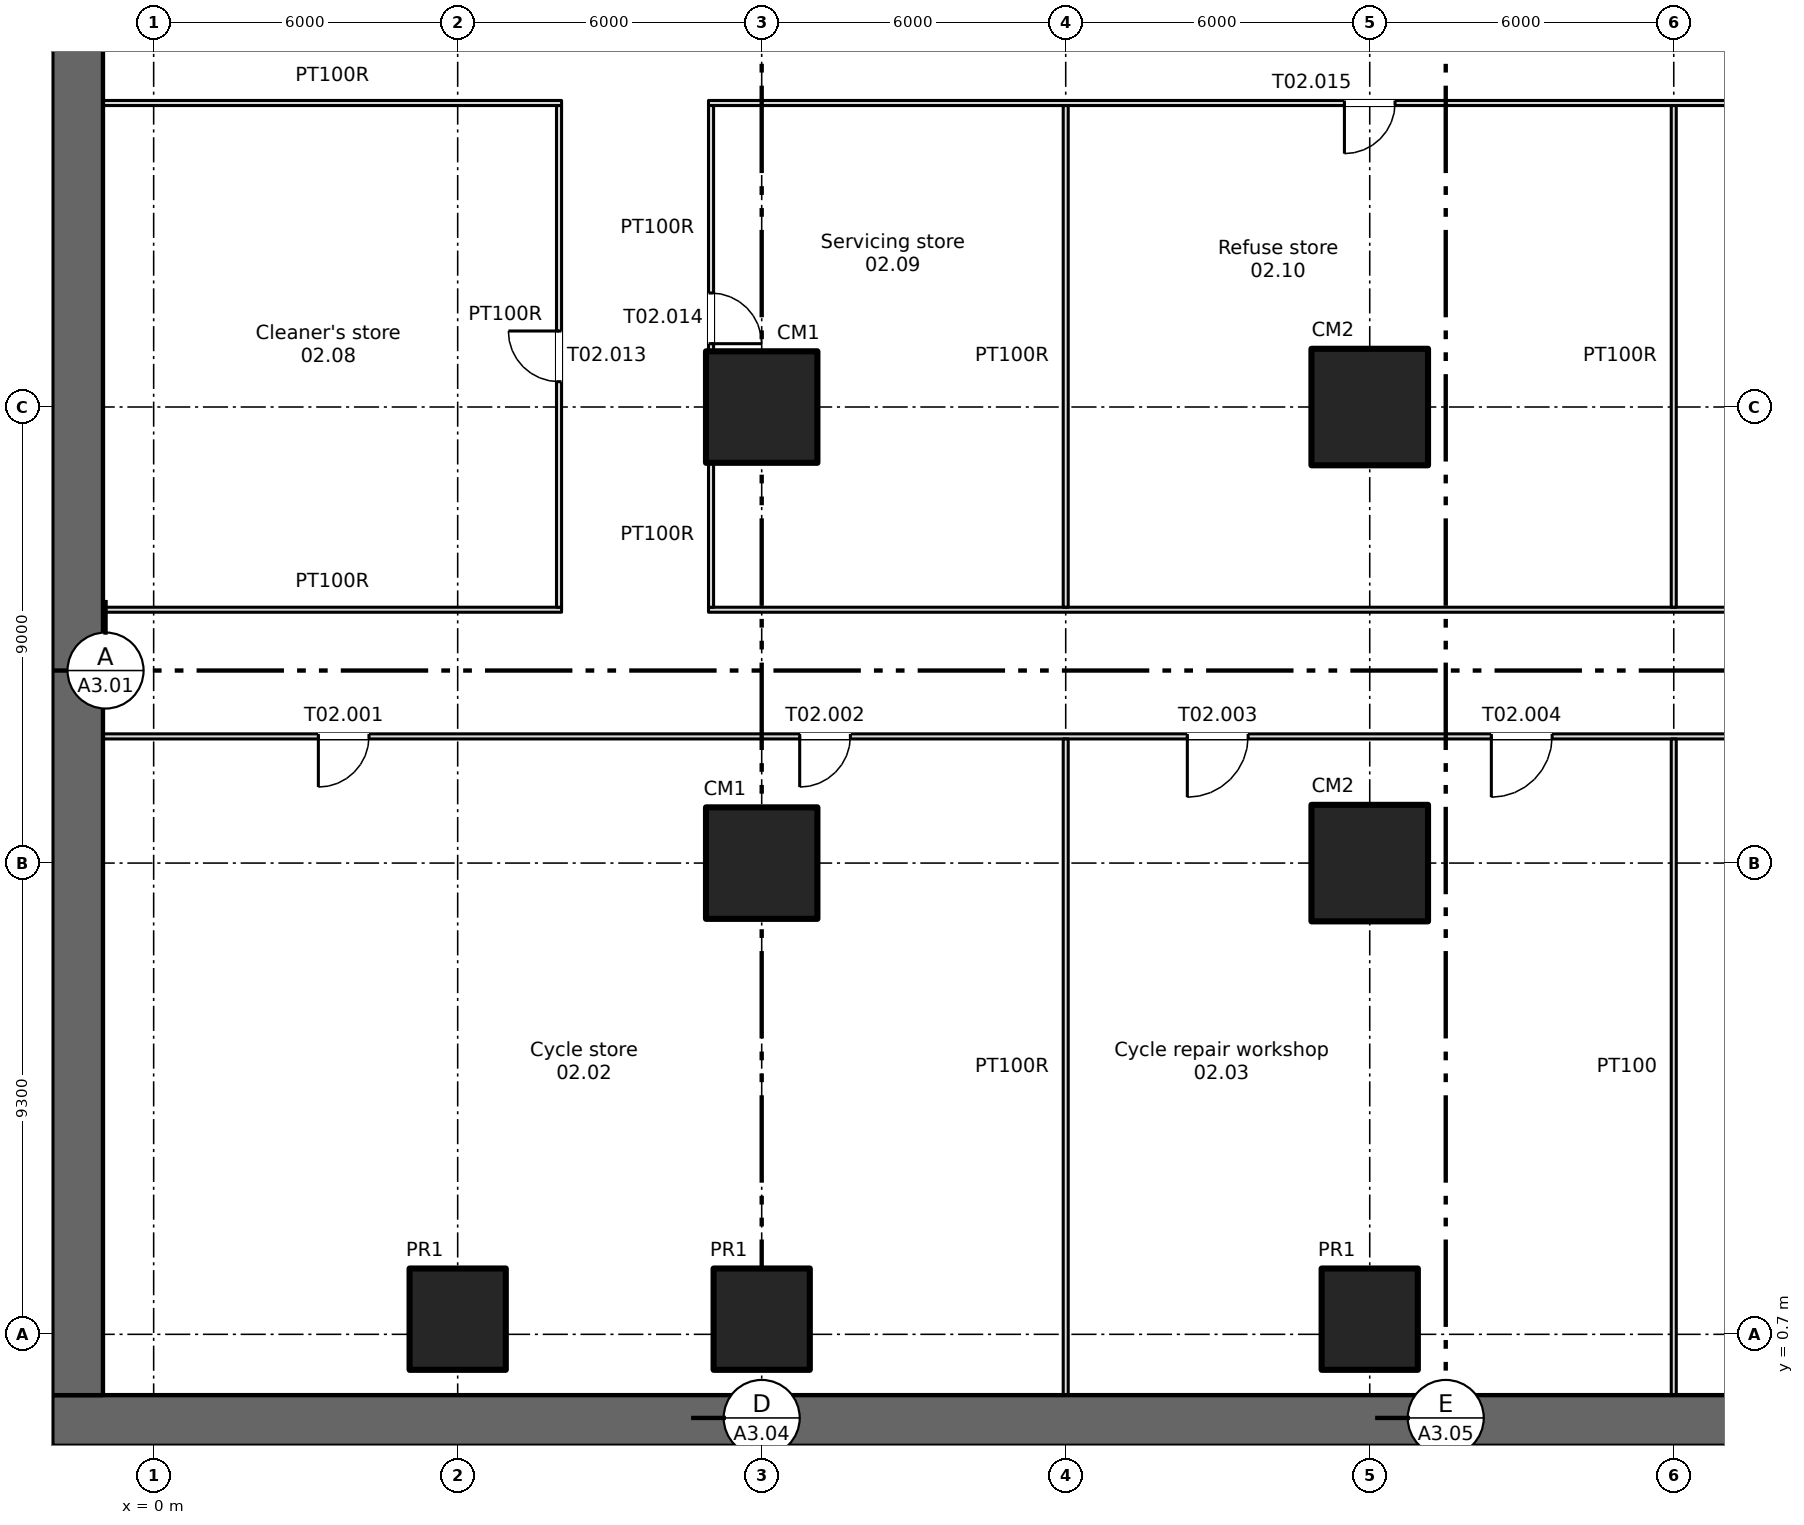
"""IFC4 building model, lengths in metres.
Left out: names, types, materials, properties, quantities, classifications, styles, units other than length and angle.
Written with IfcOpenShell. Run it as: python <this file> out.ifc"""

import sys

from ifc_helpers import new_model, si_unit, direction, frame, frame_2d, origin, origin_2d, place, context, subcontext, project, spatial, rectangle, extrude, element, fill, save


model = new_model("IFC4")
c1 = context("Model", 3, precision=1e-05, world=origin(), true_north=direction((0.0, 1.0)))
c2 = subcontext(c1, "Body", "Model", "MODEL_VIEW")
j1 = project(units=[si_unit("LENGTHUNIT", "METRE"), si_unit("PLANEANGLEUNIT", "RADIAN")], contexts=[c1])
p1 = place(None, origin())
s1 = spatial("IfcSite", under=j1, at=p1, CompositionType="ELEMENT")
p2 = place(p1, origin())
s2 = spatial("IfcBuilding", under=s1, at=p2, CompositionType="ELEMENT")
p3 = place(p2, frame((0.0, 0.0, -6.0)))
s3 = spatial("IfcBuildingStorey", under=s2, at=p3, CompositionType="ELEMENT", Elevation=-6.0)
p4 = place(p3, frame((-2.0, -1.0, 0.0), z_axis=(0.0, 0.0, 1.0), x_axis=(1.0, 0.0, 0.0)))
e1 = element("IfcWall", 1, at=p4, inside=s3, PredefinedType="SOLIDWALL", context=c2, shape_type="SweptSolid", body=[
    extrude(rectangle(XDim=82.0, YDim=1.0, at=frame_2d((41.0, 0.0))), origin(), (0.0, 0.0, 1.0), 5.55),
])
p5 = place(p3, frame((-1.5, -0.5, 0.0), z_axis=(0.0, 0.0, 1.0), x_axis=(0.0, 1.0, 0.0)))
e2 = element("IfcWall", 2, at=p5, inside=s3, PredefinedType="SOLIDWALL", context=c2, shape_type="SweptSolid", body=[
    extrude(rectangle(XDim=46.0, YDim=1.0, at=frame_2d((23.0, 0.0))), origin(), (0.0, 0.0, 1.0), 5.55),
])
for number, where, z_axis, x_axis in (
    (3, (6.0, 1.0, 0.0), (0.0, 0.0, 1.0), (1.0, 0.0, 0.0)),
    (4, (12.0, 1.0, 0.0), (0.0, 0.0, 1.0), (1.0, 0.0, 0.0)),
    (5, (24.0, 1.0, 0.0), (0.0, 0.0, 1.0), (1.0, 0.0, 0.0)),
):
    element("IfcColumn", number, at=place(p3, frame(where, z_axis=z_axis, x_axis=x_axis)), inside=s3, PredefinedType="COLUMN", context=c2, shape_type="SweptSolid", body=[
        extrude(rectangle(XDim=1.9, YDim=2.0, at=origin_2d()), origin(), (0.0, 0.0, 1.0), 5.55),
    ])
for number, where, z_axis, x_axis in (
    (6, (12.0, 10.0, 0.0), (0.0, 0.0, 1.0), (1.0, 0.0, 0.0)),
    (7, (12.0, 19.0, 0.0), (0.0, 0.0, 1.0), (1.0, 0.0, 0.0)),
):
    element("IfcColumn", number, at=place(p3, frame(where, z_axis=z_axis, x_axis=x_axis)), inside=s3, PredefinedType="COLUMN", context=c2, shape_type="SweptSolid", body=[
        extrude(rectangle(XDim=2.2, YDim=2.2, at=origin_2d()), origin(), (0.0, 0.0, 1.0), 5.55),
    ])
for number, where, z_axis, x_axis in (
    (8, (24.0, 10.0, 0.0), (0.0, 0.0, 1.0), (1.0, 0.0, 0.0)),
    (9, (24.0, 19.0, 0.0), (0.0, 0.0, 1.0), (1.0, 0.0, 0.0)),
):
    element("IfcColumn", number, at=place(p3, frame(where, z_axis=z_axis, x_axis=x_axis)), inside=s3, PredefinedType="COLUMN", context=c2, shape_type="SweptSolid", body=[
        extrude(rectangle(XDim=2.3, YDim=2.3, at=origin_2d()), origin(), (0.0, 0.0, 1.0), 5.55),
    ])
p6 = place(p3, frame((-1.0, 12.5, 0.0), z_axis=(0.0, 0.0, 1.0), x_axis=(1.0, 0.0, 0.0)))
e10 = element("IfcWall", 10, at=p6, inside=s3, PredefinedType="PARTITIONING", context=c2, shape_type="SweptSolid", body=[
    extrude(rectangle(XDim=80.0, YDim=0.1, at=frame_2d((40.0, 0.0))), origin(), (0.0, 0.0, 1.0), 5.55),
])
p7 = place(p6, frame((4.25, 0.0, 0.0)))
e11 = element("IfcOpeningElement", 11, at=p7, cuts=e10, PredefinedType="OPENING", context=c2, shape_type="SweptSolid", body=[
    extrude(rectangle(XDim=1.0, YDim=2.1, at=frame_2d((0.5, 1.05))), frame((0.0, 0.06, 0.0), z_axis=(0.0, -1.0, 0.0), x_axis=(1.0, 0.0, 0.0)), (0.0, 0.0, 1.0), 0.12),
])
p8 = place(p6, frame((13.75, 0.0, 0.0)))
e12 = element("IfcOpeningElement", 12, at=p8, cuts=e10, PredefinedType="OPENING", context=c2, shape_type="SweptSolid", body=[
    extrude(rectangle(XDim=1.0, YDim=2.1, at=frame_2d((0.5, 1.05))), frame((0.0, 0.06, 0.0), z_axis=(0.0, -1.0, 0.0), x_axis=(1.0, 0.0, 0.0)), (0.0, 0.0, 1.0), 0.12),
])
p9 = place(p6, frame((21.4, 0.0, 0.0)))
e13 = element("IfcOpeningElement", 13, at=p9, cuts=e10, PredefinedType="OPENING", context=c2, shape_type="SweptSolid", body=[
    extrude(rectangle(XDim=1.2, YDim=2.1, at=frame_2d((0.6, 1.05))), frame((0.0, 0.06, 0.0), z_axis=(0.0, -1.0, 0.0), x_axis=(1.0, 0.0, 0.0)), (0.0, 0.0, 1.0), 0.12),
])
p10 = place(p6, frame((27.4, 0.0, 0.0)))
e14 = element("IfcOpeningElement", 14, at=p10, cuts=e10, PredefinedType="OPENING", context=c2, shape_type="SweptSolid", body=[
    extrude(rectangle(XDim=1.2, YDim=2.1, at=frame_2d((0.6, 1.05))), frame((0.0, 0.06, 0.0), z_axis=(0.0, -1.0, 0.0), x_axis=(1.0, 0.0, 0.0)), (0.0, 0.0, 1.0), 0.12),
])
p11 = place(p6, frame((33.4, 0.0, 0.0)))
e15 = element("IfcOpeningElement", 15, at=p11, cuts=e10, PredefinedType="OPENING", context=c2, shape_type="SweptSolid", body=[
    extrude(rectangle(XDim=1.2, YDim=2.1, at=frame_2d((0.6, 1.05))), frame((0.0, 0.06, 0.0), z_axis=(0.0, -1.0, 0.0), x_axis=(1.0, 0.0, 0.0)), (0.0, 0.0, 1.0), 0.12),
])
p12 = place(p6, frame((39.4, 0.0, 0.0)))
e16 = element("IfcOpeningElement", 16, at=p12, cuts=e10, PredefinedType="OPENING", context=c2, shape_type="SweptSolid", body=[
    extrude(rectangle(XDim=1.2, YDim=2.1, at=frame_2d((0.6, 1.05))), frame((0.0, 0.06, 0.0), z_axis=(0.0, -1.0, 0.0), x_axis=(1.0, 0.0, 0.0)), (0.0, 0.0, 1.0), 0.12),
])
p13 = place(p6, frame((45.4, 0.0, 0.0)))
e17 = element("IfcOpeningElement", 17, at=p13, cuts=e10, PredefinedType="OPENING", context=c2, shape_type="SweptSolid", body=[
    extrude(rectangle(XDim=1.2, YDim=2.1, at=frame_2d((0.6, 1.05))), frame((0.0, 0.06, 0.0), z_axis=(0.0, -1.0, 0.0), x_axis=(1.0, 0.0, 0.0)), (0.0, 0.0, 1.0), 0.12),
])
p14 = place(p6, frame((51.4, 0.0, 0.0)))
e18 = element("IfcOpeningElement", 18, at=p14, cuts=e10, PredefinedType="OPENING", context=c2, shape_type="SweptSolid", body=[
    extrude(rectangle(XDim=1.2, YDim=2.1, at=frame_2d((0.6, 1.05))), frame((0.0, 0.06, 0.0), z_axis=(0.0, -1.0, 0.0), x_axis=(1.0, 0.0, 0.0)), (0.0, 0.0, 1.0), 0.12),
])
p15 = place(p6, frame((57.4, 0.0, 0.0)))
e19 = element("IfcOpeningElement", 19, at=p15, cuts=e10, PredefinedType="OPENING", context=c2, shape_type="SweptSolid", body=[
    extrude(rectangle(XDim=1.2, YDim=2.1, at=frame_2d((0.6, 1.05))), frame((0.0, 0.06, 0.0), z_axis=(0.0, -1.0, 0.0), x_axis=(1.0, 0.0, 0.0)), (0.0, 0.0, 1.0), 0.12),
])
p16 = place(p6, frame((63.4, 0.0, 0.0)))
e20 = element("IfcOpeningElement", 20, at=p16, cuts=e10, PredefinedType="OPENING", context=c2, shape_type="SweptSolid", body=[
    extrude(rectangle(XDim=1.2, YDim=2.1, at=frame_2d((0.6, 1.05))), frame((0.0, 0.06, 0.0), z_axis=(0.0, -1.0, 0.0), x_axis=(1.0, 0.0, 0.0)), (0.0, 0.0, 1.0), 0.12),
])
p17 = place(p6, frame((69.75, 0.0, 0.0)))
e21 = element("IfcOpeningElement", 21, at=p17, cuts=e10, PredefinedType="OPENING", context=c2, shape_type="SweptSolid", body=[
    extrude(rectangle(XDim=1.0, YDim=2.1, at=frame_2d((0.5, 1.05))), frame((0.0, 0.06, 0.0), z_axis=(0.0, -1.0, 0.0), x_axis=(1.0, 0.0, 0.0)), (0.0, 0.0, 1.0), 0.12),
])
p18 = place(p6, frame((76.25, 0.0, 0.0)))
e22 = element("IfcOpeningElement", 22, at=p18, cuts=e10, PredefinedType="OPENING", context=c2, shape_type="SweptSolid", body=[
    extrude(rectangle(XDim=1.0, YDim=2.1, at=frame_2d((0.5, 1.05))), frame((0.0, 0.06, 0.0), z_axis=(0.0, -1.0, 0.0), x_axis=(1.0, 0.0, 0.0)), (0.0, 0.0, 1.0), 0.12),
])
p19 = place(p3, frame((-1.0, 15.0, 0.0), z_axis=(0.0, 0.0, 1.0), x_axis=(1.0, 0.0, 0.0)))
e23 = element("IfcWall", 23, at=p19, inside=s3, PredefinedType="PARTITIONING", context=c2, shape_type="SweptSolid", body=[
    extrude(rectangle(XDim=9.05, YDim=0.1, at=frame_2d((4.525, 0.0))), origin(), (0.0, 0.0, 1.0), 5.55),
])
p20 = place(p3, frame((10.95, 15.0, 0.0), z_axis=(0.0, 0.0, 1.0), x_axis=(1.0, 0.0, 0.0)))
e24 = element("IfcWall", 24, at=p20, inside=s3, PredefinedType="PARTITIONING", context=c2, shape_type="SweptSolid", body=[
    extrude(rectangle(XDim=56.1, YDim=0.1, at=frame_2d((28.05, 0.0))), origin(), (0.0, 0.0, 1.0), 5.55),
])
p21 = place(p3, frame((-1.0, 25.0, 0.0), z_axis=(0.0, 0.0, 1.0), x_axis=(1.0, 0.0, 0.0)))
e25 = element("IfcWall", 25, at=p21, inside=s3, PredefinedType="PARTITIONING", context=c2, shape_type="SweptSolid", body=[
    extrude(rectangle(XDim=9.05, YDim=0.1, at=frame_2d((4.525, 0.0))), origin(), (0.0, 0.0, 1.0), 5.55),
])
p22 = place(p3, frame((10.95, 25.0, 0.0), z_axis=(0.0, 0.0, 1.0), x_axis=(1.0, 0.0, 0.0)))
e26 = element("IfcWall", 26, at=p22, inside=s3, PredefinedType="PARTITIONING", context=c2, shape_type="SweptSolid", body=[
    extrude(rectangle(XDim=56.1, YDim=0.1, at=frame_2d((28.05, 0.0))), origin(), (0.0, 0.0, 1.0), 5.55),
])
p23 = place(p22, frame((12.55, 0.0, 0.0)))
e27 = element("IfcOpeningElement", 27, at=p23, cuts=e26, PredefinedType="OPENING", context=c2, shape_type="SweptSolid", body=[
    extrude(rectangle(XDim=1.0, YDim=2.1, at=frame_2d((0.5, 1.05))), frame((0.0, 0.06, 0.0), z_axis=(0.0, -1.0, 0.0), x_axis=(1.0, 0.0, 0.0)), (0.0, 0.0, 1.0), 0.12),
])
p24 = place(p22, frame((24.15, 0.0, 0.0)))
e28 = element("IfcOpeningElement", 28, at=p24, cuts=e26, PredefinedType="OPENING", context=c2, shape_type="SweptSolid", body=[
    extrude(rectangle(XDim=1.8, YDim=2.1, at=frame_2d((0.9, 1.05))), frame((0.0, 0.06, 0.0), z_axis=(0.0, -1.0, 0.0), x_axis=(1.0, 0.0, 0.0)), (0.0, 0.0, 1.0), 0.12),
])
p25 = place(p22, frame((36.55, 0.0, 0.0)))
e29 = element("IfcOpeningElement", 29, at=p25, cuts=e26, PredefinedType="OPENING", context=c2, shape_type="SweptSolid", body=[
    extrude(rectangle(XDim=1.0, YDim=2.1, at=frame_2d((0.5, 1.05))), frame((0.0, 0.06, 0.0), z_axis=(0.0, -1.0, 0.0), x_axis=(1.0, 0.0, 0.0)), (0.0, 0.0, 1.0), 0.12),
])
p26 = place(p22, frame((49.05, 0.0, 0.0)))
e30 = element("IfcOpeningElement", 30, at=p26, cuts=e26, PredefinedType="OPENING", context=c2, shape_type="SweptSolid", body=[
    extrude(rectangle(XDim=1.0, YDim=2.1, at=frame_2d((0.5, 1.05))), frame((0.0, 0.06, 0.0), z_axis=(0.0, -1.0, 0.0), x_axis=(1.0, 0.0, 0.0)), (0.0, 0.0, 1.0), 0.12),
])
p27 = place(p3, frame((8.0, 15.05, 0.0), z_axis=(0.0, 0.0, 1.0), x_axis=(0.0, 1.0, 0.0)))
e31 = element("IfcWall", 31, at=p27, inside=s3, PredefinedType="PARTITIONING", context=c2, shape_type="SweptSolid", body=[
    extrude(rectangle(XDim=9.9, YDim=0.1, at=frame_2d((4.95, 0.0))), origin(), (0.0, 0.0, 1.0), 5.55),
])
p28 = place(p27, frame((4.45, 0.0, 0.0)))
e32 = element("IfcOpeningElement", 32, at=p28, cuts=e31, PredefinedType="OPENING", context=c2, shape_type="SweptSolid", body=[
    extrude(rectangle(XDim=1.0, YDim=2.1, at=frame_2d((0.5, 1.05))), frame((0.0, 0.06, 0.0), z_axis=(0.0, -1.0, 0.0), x_axis=(1.0, 0.0, 0.0)), (0.0, 0.0, 1.0), 0.12),
])
p29 = place(p3, frame((11.0, 15.05, 0.0), z_axis=(0.0, 0.0, 1.0), x_axis=(0.0, 1.0, 0.0)))
e33 = element("IfcWall", 33, at=p29, inside=s3, PredefinedType="PARTITIONING", context=c2, shape_type="SweptSolid", body=[
    extrude(rectangle(XDim=2.85, YDim=0.1, at=frame_2d((1.425, 0.0))), origin(), (0.0, 0.0, 1.0), 5.55),
])
p30 = place(p3, frame((11.0, 20.1, 0.0), z_axis=(0.0, 0.0, 1.0), x_axis=(0.0, 1.0, 0.0)))
e34 = element("IfcWall", 34, at=p30, inside=s3, PredefinedType="PARTITIONING", context=c2, shape_type="SweptSolid", body=[
    extrude(rectangle(XDim=4.85, YDim=0.1, at=frame_2d((2.425, 0.0))), origin(), (0.0, 0.0, 1.0), 5.55),
])
p31 = place(p30, frame((0.15, 0.0, 0.0)))
e35 = element("IfcOpeningElement", 35, at=p31, cuts=e34, PredefinedType="OPENING", context=c2, shape_type="SweptSolid", body=[
    extrude(rectangle(XDim=1.0, YDim=2.1, at=frame_2d((0.5, 1.05))), frame((0.0, 0.06, 0.0), z_axis=(0.0, -1.0, 0.0), x_axis=(1.0, 0.0, 0.0)), (0.0, 0.0, 1.0), 0.12),
])
p32 = place(p3, frame((18.0, -0.5, 0.0), z_axis=(0.0, 0.0, 1.0), x_axis=(0.0, 1.0, 0.0)))
e36 = element("IfcWall", 36, at=p32, inside=s3, PredefinedType="PARTITIONING", context=c2, shape_type="SweptSolid", body=[
    extrude(rectangle(XDim=12.95, YDim=0.1, at=frame_2d((6.475, 0.0))), origin(), (0.0, 0.0, 1.0), 5.55),
])
p33 = place(p3, frame((18.0, 15.05, 0.0), z_axis=(0.0, 0.0, 1.0), x_axis=(0.0, 1.0, 0.0)))
e37 = element("IfcWall", 37, at=p33, inside=s3, PredefinedType="PARTITIONING", context=c2, shape_type="SweptSolid", body=[
    extrude(rectangle(XDim=9.9, YDim=0.1, at=frame_2d((4.95, 0.0))), origin(), (0.0, 0.0, 1.0), 5.55),
])
p34 = place(p3, frame((30.0, -0.5, 0.0), z_axis=(0.0, 0.0, 1.0), x_axis=(0.0, 1.0, 0.0)))
e38 = element("IfcWall", 38, at=p34, inside=s3, PredefinedType="PARTITIONING", context=c2, shape_type="SweptSolid", body=[
    extrude(rectangle(XDim=12.95, YDim=0.1, at=frame_2d((6.475, 0.0))), origin(), (0.0, 0.0, 1.0), 5.55),
])
p35 = place(p3, frame((30.0, 15.05, 0.0), z_axis=(0.0, 0.0, 1.0), x_axis=(0.0, 1.0, 0.0)))
e39 = element("IfcWall", 39, at=p35, inside=s3, PredefinedType="PARTITIONING", context=c2, shape_type="SweptSolid", body=[
    extrude(rectangle(XDim=9.9, YDim=0.1, at=frame_2d((4.95, 0.0))), origin(), (0.0, 0.0, 1.0), 5.55),
])
p36 = place(p7, origin())
e40 = element("IfcDoor", 40, at=p36, inside=s3, OperationType="SINGLE_SWING_LEFT", PredefinedType="DOOR", context=c2, shape_type="SweptSolid", body=[
    extrude(rectangle(XDim=1.0, YDim=2.1, at=frame_2d((0.5, 1.05))), frame((0.0, 0.025, 0.0), z_axis=(0.0, -1.0, 0.0), x_axis=(1.0, 0.0, 0.0)), (0.0, 0.0, 1.0), 0.05),
])
fill(e11, e40)
p37 = place(p8, origin())
e41 = element("IfcDoor", 41, at=p37, inside=s3, OperationType="SINGLE_SWING_LEFT", PredefinedType="DOOR", context=c2, shape_type="SweptSolid", body=[
    extrude(rectangle(XDim=1.0, YDim=2.1, at=frame_2d((0.5, 1.05))), frame((0.0, 0.025, 0.0), z_axis=(0.0, -1.0, 0.0), x_axis=(1.0, 0.0, 0.0)), (0.0, 0.0, 1.0), 0.05),
])
fill(e12, e41)
p38 = place(p9, origin())
e42 = element("IfcDoor", 42, at=p38, inside=s3, OperationType="SINGLE_SWING_LEFT", PredefinedType="DOOR", context=c2, shape_type="SweptSolid", body=[
    extrude(rectangle(XDim=1.2, YDim=2.1, at=frame_2d((0.6, 1.05))), frame((0.0, 0.025, 0.0), z_axis=(0.0, -1.0, 0.0), x_axis=(1.0, 0.0, 0.0)), (0.0, 0.0, 1.0), 0.05),
])
fill(e13, e42)
p39 = place(p10, origin())
e43 = element("IfcDoor", 43, at=p39, inside=s3, OperationType="SINGLE_SWING_LEFT", PredefinedType="DOOR", context=c2, shape_type="SweptSolid", body=[
    extrude(rectangle(XDim=1.2, YDim=2.1, at=frame_2d((0.6, 1.05))), frame((0.0, 0.025, 0.0), z_axis=(0.0, -1.0, 0.0), x_axis=(1.0, 0.0, 0.0)), (0.0, 0.0, 1.0), 0.05),
])
fill(e14, e43)
p40 = place(p28, origin())
e44 = element("IfcDoor", 44, at=p40, inside=s3, OperationType="SINGLE_SWING_RIGHT", PredefinedType="DOOR", context=c2, shape_type="SweptSolid", body=[
    extrude(rectangle(XDim=1.0, YDim=2.1, at=frame_2d((0.5, 1.05))), frame((0.0, 0.025, 0.0), z_axis=(0.0, -1.0, 0.0), x_axis=(1.0, 0.0, 0.0)), (0.0, 0.0, 1.0), 0.05),
])
fill(e32, e44)
p41 = place(p31, origin())
e45 = element("IfcDoor", 45, at=p41, inside=s3, OperationType="SINGLE_SWING_LEFT", PredefinedType="DOOR", context=c2, shape_type="SweptSolid", body=[
    extrude(rectangle(XDim=1.0, YDim=2.1, at=frame_2d((0.5, 1.05))), frame((0.0, 0.025, 0.0), z_axis=(0.0, -1.0, 0.0), x_axis=(1.0, 0.0, 0.0)), (0.0, 0.0, 1.0), 0.05),
])
fill(e35, e45)
p42 = place(p23, origin())
e46 = element("IfcDoor", 46, at=p42, inside=s3, OperationType="SINGLE_SWING_LEFT", PredefinedType="DOOR", context=c2, shape_type="SweptSolid", body=[
    extrude(rectangle(XDim=1.0, YDim=2.1, at=frame_2d((0.5, 1.05))), frame((0.0, 0.025, 0.0), z_axis=(0.0, -1.0, 0.0), x_axis=(1.0, 0.0, 0.0)), (0.0, 0.0, 1.0), 0.05),
])
fill(e27, e46)
save(model, sys.argv[1])
